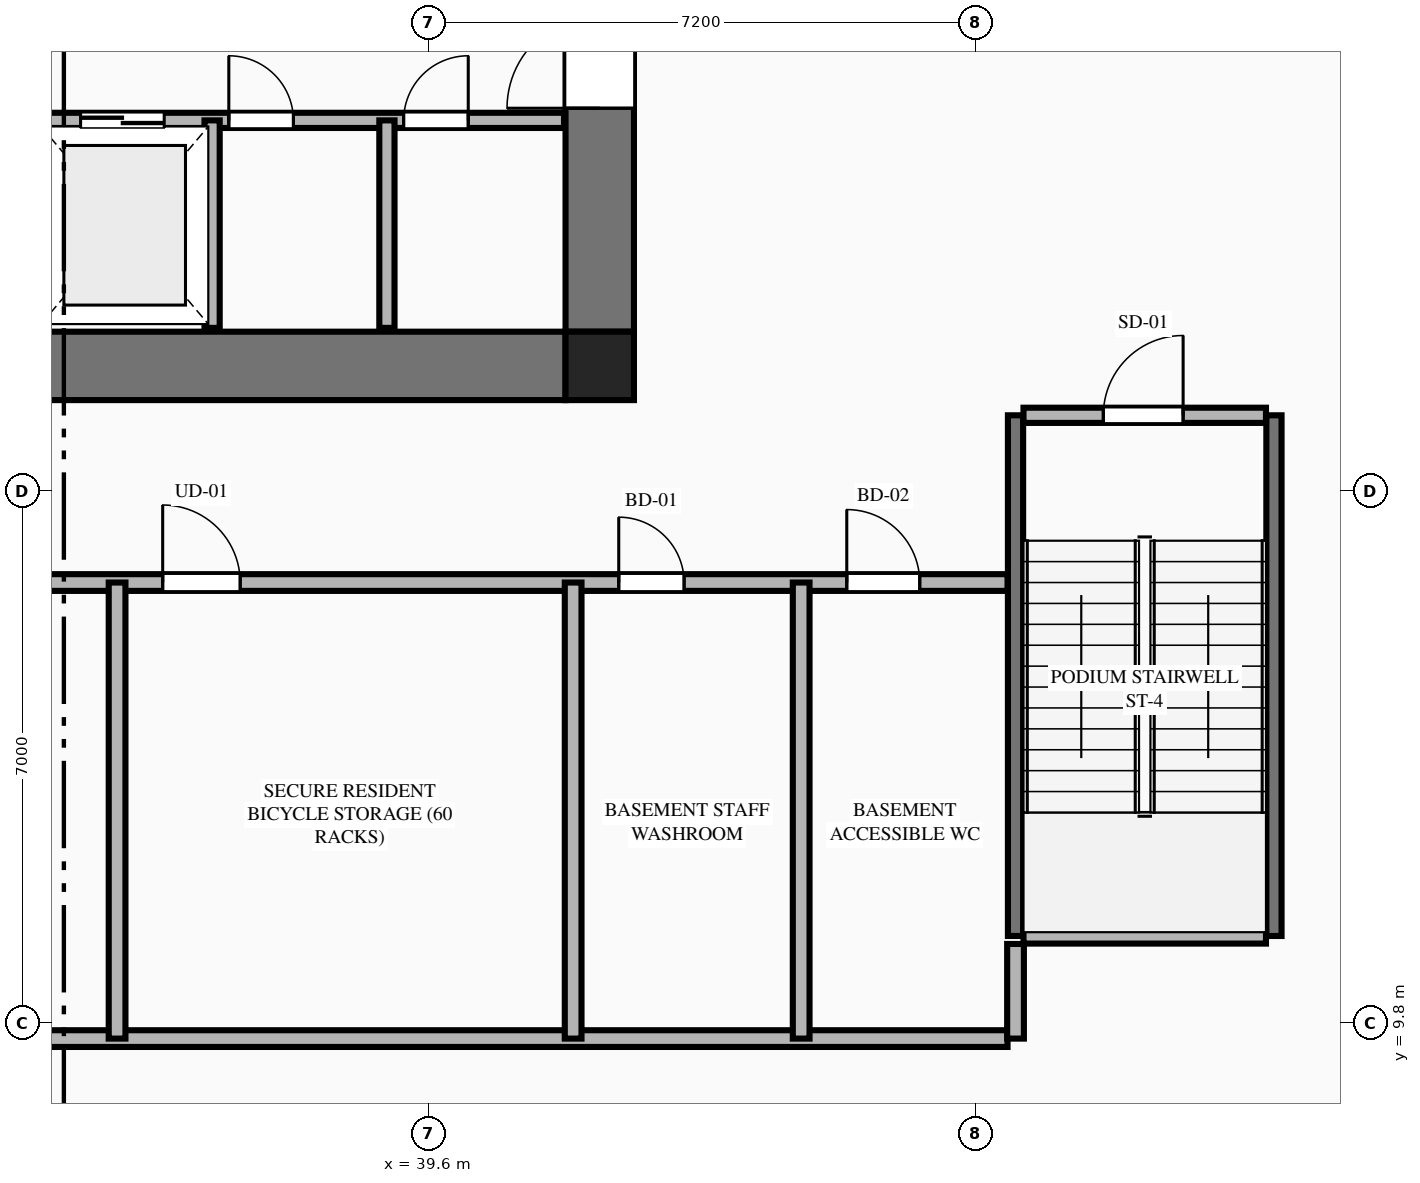
"""IFC4 building model, lengths in metres.
Left out: names, types, materials, properties, quantities, classifications, styles, units other than length and angle.
Written with IfcOpenShell. Run it as: python <this file> out.ifc"""

import sys

from ifc_helpers import new_model, si_unit, direction, frame, frame_2d, origin, origin_2d, place, context, subcontext, project, spatial, rectangle, extrude, element, fill, save


model = new_model("IFC4")
c1 = context("Model", 3, precision=1e-05, world=origin(), true_north=direction((0.0, 1.0)))
c2 = subcontext(c1, "Body", "Model", "MODEL_VIEW")
j1 = project(units=[si_unit("LENGTHUNIT", "METRE"), si_unit("PLANEANGLEUNIT", "RADIAN")], contexts=[c1])
p1 = place(None, origin())
s1 = spatial("IfcSite", under=j1, at=p1, CompositionType="ELEMENT")
p2 = place(p1, origin())
s2 = spatial("IfcBuilding", under=s1, at=p2, CompositionType="ELEMENT")
p3 = place(p2, frame((0.0, 0.0, -4.8)))
s3 = spatial("IfcBuildingStorey", under=s2, at=p3, CompositionType="ELEMENT", Elevation=-4.8)
p4 = place(p3, frame((51.103, 1.612, 0.0), z_axis=(0.0, 0.0, 1.0), x_axis=(0.484504224603, 0.874788921021, 0.0)))
e1 = element("IfcWall", 1, at=p4, inside=s3, PredefinedType="USERDEFINED", context=c2, shape_type="SweptSolid", body=[
    extrude(rectangle(XDim=26.15, YDim=0.6, at=frame_2d((13.075, 0.0))), origin(), (0.0, 0.0, 1.0), 4.55),
])
p5 = place(p3, frame((41.85, 18.45, 0.0), z_axis=(0.0, 0.0, 1.0), x_axis=(1.0, 0.0, 0.0)))
e2 = element("IfcColumn", 2, at=p5, inside=s3, PredefinedType="COLUMN", context=c2, shape_type="SweptSolid", body=[
    extrude(rectangle(XDim=0.9, YDim=0.9, at=origin_2d()), origin(), (0.0, 0.0, 1.0), 4.8),
])
p6 = place(p3, frame((23.4, 18.45, 0.0), z_axis=(0.0, 0.0, 1.0), x_axis=(1.0, 0.0, 0.0)))
e3 = element("IfcWall", 3, at=p6, inside=s3, PredefinedType="SHEAR", context=c2, shape_type="SweptSolid", body=[
    extrude(rectangle(XDim=18.0, YDim=0.9, at=frame_2d((9.0, 0.0))), origin(), (0.0, 0.0, 1.0), 4.55),
])
p7 = place(p3, frame((41.85, 18.9, 0.0), z_axis=(0.0, 0.0, 1.0), x_axis=(0.0, 1.0, 0.0)))
e4 = element("IfcWall", 4, at=p7, inside=s3, PredefinedType="SHEAR", context=c2, shape_type="SweptSolid", body=[
    extrude(rectangle(XDim=14.0, YDim=0.9, at=frame_2d((7.0, 0.0))), origin(), (0.0, 0.0, 1.0), 4.55),
])
p8 = place(p7, frame((2.94, 0.0, 0.0)))
e5 = element("IfcOpeningElement", 5, at=p8, cuts=e4, PredefinedType="OPENING", context=c2, shape_type="SweptSolid", body=[
    extrude(rectangle(XDim=1.22, YDim=2.25, at=frame_2d((0.61, 1.125))), frame((0.0, 0.46, 0.0), z_axis=(0.0, -1.0, 0.0), x_axis=(1.0, 0.0, 0.0)), (0.0, 0.0, 1.0), 0.92),
])
p9 = place(p3, frame((23.42, 21.68, 0.0), z_axis=(0.0, 0.0, 1.0), x_axis=(1.0, 0.0, 0.0)))
e6 = element("IfcWall", 6, at=p9, inside=s3, PredefinedType="PLUMBINGWALL", context=c2, shape_type="SweptSolid", body=[
    extrude(rectangle(XDim=17.96, YDim=0.2, at=frame_2d((8.98, 0.0))), origin(), (0.0, 0.0, 1.0), 4.55),
])
p10 = place(p9, frame((4.45, 0.0, 0.0)))
e7 = element("IfcOpeningElement", 7, at=p10, cuts=e6, PredefinedType="OPENING", context=c2, shape_type="SweptSolid", body=[
    extrude(rectangle(XDim=1.1, YDim=2.2, at=frame_2d((0.55, 1.1))), frame((0.0, 0.11, 0.0), z_axis=(0.0, -1.0, 0.0), x_axis=(1.0, 0.0, 0.0)), (0.0, 0.0, 1.0), 0.22),
])
p11 = place(p9, frame((6.85, 0.0, 0.0)))
e8 = element("IfcOpeningElement", 8, at=p11, cuts=e6, PredefinedType="OPENING", context=c2, shape_type="SweptSolid", body=[
    extrude(rectangle(XDim=1.1, YDim=2.2, at=frame_2d((0.55, 1.1))), frame((0.0, 0.11, 0.0), z_axis=(0.0, -1.0, 0.0), x_axis=(1.0, 0.0, 0.0)), (0.0, 0.0, 1.0), 0.22),
])
p12 = place(p9, frame((9.25, 0.0, 0.0)))
e9 = element("IfcOpeningElement", 9, at=p12, cuts=e6, PredefinedType="OPENING", context=c2, shape_type="SweptSolid", body=[
    extrude(rectangle(XDim=1.1, YDim=2.2, at=frame_2d((0.55, 1.1))), frame((0.0, 0.11, 0.0), z_axis=(0.0, -1.0, 0.0), x_axis=(1.0, 0.0, 0.0)), (0.0, 0.0, 1.0), 0.22),
])
p13 = place(p9, frame((11.6, 0.0, 0.0)))
e10 = element("IfcOpeningElement", 10, at=p13, cuts=e6, PredefinedType="OPENING", context=c2, shape_type="SweptSolid", body=[
    extrude(rectangle(XDim=1.1, YDim=2.2, at=frame_2d((0.55, 1.1))), frame((0.0, 0.11, 0.0), z_axis=(0.0, -1.0, 0.0), x_axis=(1.0, 0.0, 0.0)), (0.0, 0.0, 1.0), 0.22),
])
p14 = place(p9, frame((1.2, 0.0, 0.0)))
e11 = element("IfcOpeningElement", 11, at=p14, cuts=e6, PredefinedType="OPENING", context=c2, shape_type="SweptSolid", body=[
    extrude(rectangle(XDim=0.85, YDim=2.05, at=frame_2d((0.425, 1.025))), frame((0.0, 0.11, 0.0), z_axis=(0.0, -1.0, 0.0), x_axis=(1.0, 0.0, 0.0)), (0.0, 0.0, 1.0), 0.22),
])
p15 = place(p9, frame((13.55, 0.0, 0.0)))
e12 = element("IfcOpeningElement", 12, at=p15, cuts=e6, PredefinedType="OPENING", context=c2, shape_type="SweptSolid", body=[
    extrude(rectangle(XDim=0.85, YDim=2.05, at=frame_2d((0.425, 1.025))), frame((0.0, 0.11, 0.0), z_axis=(0.0, -1.0, 0.0), x_axis=(1.0, 0.0, 0.0)), (0.0, 0.0, 1.0), 0.22),
])
p16 = place(p9, frame((15.85, 0.0, 0.0)))
e13 = element("IfcOpeningElement", 13, at=p16, cuts=e6, PredefinedType="OPENING", context=c2, shape_type="SweptSolid", body=[
    extrude(rectangle(XDim=0.85, YDim=2.05, at=frame_2d((0.425, 1.025))), frame((0.0, 0.11, 0.0), z_axis=(0.0, -1.0, 0.0), x_axis=(1.0, 0.0, 0.0)), (0.0, 0.0, 1.0), 0.22),
])
for number, where, z_axis, x_axis in (
    (14, (36.75, 18.95, 0.0), (0.0, 0.0, 1.0), (0.0, 1.0, 0.0)),
    (15, (39.05, 18.95, 0.0), (0.0, 0.0, 1.0), (0.0, 1.0, 0.0)),
):
    element("IfcWall", number, at=place(p3, frame(where, z_axis=z_axis, x_axis=x_axis)), inside=s3, PredefinedType="PLUMBINGWALL", context=c2, shape_type="SweptSolid", body=[
        extrude(rectangle(XDim=2.73, YDim=0.2, at=frame_2d((1.365, 0.0))), origin(), (0.0, 0.0, 1.0), 4.55),
    ])
for number, where, z_axis, x_axis in (
    (16, (47.32, 10.95, 0.0), (0.0, 0.0, 1.0), (0.0, 1.0, 0.0)),
    (17, (50.72, 10.95, 0.0), (0.0, 0.0, 1.0), (0.0, 1.0, 0.0)),
):
    element("IfcWall", number, at=place(p3, frame(where, z_axis=z_axis, x_axis=x_axis)), inside=s3, PredefinedType="SHEAR", context=c2, shape_type="SweptSolid", body=[
        extrude(rectangle(XDim=6.85, YDim=0.2, at=frame_2d((3.425, 0.0))), origin(), (0.0, 0.0, 1.0), 4.8),
    ])
p17 = place(p3, frame((47.425, 10.95, 0.0), z_axis=(0.0, 0.0, 1.0), x_axis=(1.0, 0.0, 0.0)))
e18 = element("IfcWall", 18, at=p17, inside=s3, PredefinedType="PLUMBINGWALL", context=c2, shape_type="SweptSolid", body=[
    extrude(rectangle(XDim=3.19, YDim=0.2, at=frame_2d((1.595, 0.0))), origin(), (0.0, 0.0, 1.0), 4.55),
])
p18 = place(p3, frame((47.425, 17.8, 0.0), z_axis=(0.0, 0.0, 1.0), x_axis=(1.0, 0.0, 0.0)))
e19 = element("IfcWall", 19, at=p18, inside=s3, PredefinedType="PLUMBINGWALL", context=c2, shape_type="SweptSolid", body=[
    extrude(rectangle(XDim=3.19, YDim=0.2, at=frame_2d((1.595, 0.0))), origin(), (0.0, 0.0, 1.0), 4.55),
])
p19 = place(p18, frame((1.05, 0.0, 0.0)))
e20 = element("IfcOpeningElement", 20, at=p19, cuts=e19, PredefinedType="OPENING", context=c2, shape_type="SweptSolid", body=[
    extrude(rectangle(XDim=1.05, YDim=2.15, at=frame_2d((0.525, 1.075))), frame((0.0, 0.11, 0.0), z_axis=(0.0, -1.0, 0.0), x_axis=(1.0, 0.0, 0.0)), (0.0, 0.0, 1.0), 0.22),
])
p20 = place(p3, frame((17.625, 15.6, 0.0), z_axis=(0.0, 0.0, 1.0), x_axis=(1.0, 0.0, 0.0)))
e21 = element("IfcWall", 21, at=p20, inside=s3, PredefinedType="PARTITIONING", context=c2, shape_type="SweptSolid", body=[
    extrude(rectangle(XDim=29.59, YDim=0.22, at=frame_2d((14.795, 0.0))), origin(), (0.0, 0.0, 1.0), 4.55),
])
p21 = place(p20, frame((0.575, 0.0, 0.0)))
e22 = element("IfcOpeningElement", 22, at=p21, cuts=e21, PredefinedType="OPENING", context=c2, shape_type="SweptSolid", body=[
    extrude(rectangle(XDim=1.25, YDim=2.25, at=frame_2d((0.625, 1.125))), frame((0.0, 0.12, 0.0), z_axis=(0.0, -1.0, 0.0), x_axis=(1.0, 0.0, 0.0)), (0.0, 0.0, 1.0), 0.24),
])
p22 = place(p20, frame((6.475, 0.0, 0.0)))
e23 = element("IfcOpeningElement", 23, at=p22, cuts=e21, PredefinedType="OPENING", context=c2, shape_type="SweptSolid", body=[
    extrude(rectangle(XDim=1.25, YDim=2.25, at=frame_2d((0.625, 1.125))), frame((0.0, 0.12, 0.0), z_axis=(0.0, -1.0, 0.0), x_axis=(1.0, 0.0, 0.0)), (0.0, 0.0, 1.0), 0.24),
])
p23 = place(p20, frame((12.475, 0.0, 0.0)))
e24 = element("IfcOpeningElement", 24, at=p23, cuts=e21, PredefinedType="OPENING", context=c2, shape_type="SweptSolid", body=[
    extrude(rectangle(XDim=1.25, YDim=2.25, at=frame_2d((0.625, 1.125))), frame((0.0, 0.12, 0.0), z_axis=(0.0, -1.0, 0.0), x_axis=(1.0, 0.0, 0.0)), (0.0, 0.0, 1.0), 0.24),
])
p24 = place(p20, frame((18.475, 0.0, 0.0)))
e25 = element("IfcOpeningElement", 25, at=p24, cuts=e21, PredefinedType="OPENING", context=c2, shape_type="SweptSolid", body=[
    extrude(rectangle(XDim=1.02, YDim=2.25, at=frame_2d((0.51, 1.125))), frame((0.0, 0.12, 0.0), z_axis=(0.0, -1.0, 0.0), x_axis=(1.0, 0.0, 0.0)), (0.0, 0.0, 1.0), 0.24),
])
p25 = place(p20, frame((24.475, 0.0, 0.0)))
e26 = element("IfcOpeningElement", 26, at=p25, cuts=e21, PredefinedType="OPENING", context=c2, shape_type="SweptSolid", body=[
    extrude(rectangle(XDim=0.86, YDim=2.1, at=frame_2d((0.43, 1.05))), frame((0.0, 0.12, 0.0), z_axis=(0.0, -1.0, 0.0), x_axis=(1.0, 0.0, 0.0)), (0.0, 0.0, 1.0), 0.24),
])
p26 = place(p20, frame((27.475, 0.0, 0.0)))
e27 = element("IfcOpeningElement", 27, at=p26, cuts=e21, PredefinedType="OPENING", context=c2, shape_type="SweptSolid", body=[
    extrude(rectangle(XDim=0.96, YDim=2.15, at=frame_2d((0.48, 1.075))), frame((0.0, 0.12, 0.0), z_axis=(0.0, -1.0, 0.0), x_axis=(1.0, 0.0, 0.0)), (0.0, 0.0, 1.0), 0.24),
])
p27 = place(p20, frame((2.1, 0.0, 0.0)))
e28 = element("IfcOpeningElement", 28, at=p27, cuts=e21, PredefinedType="OPENING", context=c2, shape_type="SweptSolid", body=[
    extrude(rectangle(XDim=3.0, YDim=2.55, at=frame_2d((1.5, 1.275))), frame((0.0, 0.12, 0.0), z_axis=(0.0, -1.0, 0.0), x_axis=(1.0, 0.0, 0.0)), (0.0, 0.0, 1.0), 0.24),
])
p28 = place(p3, frame((17.625, 9.6, 0.0), z_axis=(0.0, 0.0, 1.0), x_axis=(1.0, 0.0, 0.0)))
e29 = element("IfcWall", 29, at=p28, inside=s3, PredefinedType="PARTITIONING", context=c2, shape_type="SweptSolid", body=[
    extrude(rectangle(XDim=29.59, YDim=0.22, at=frame_2d((14.795, 0.0))), origin(), (0.0, 0.0, 1.0), 4.55),
])
p29 = place(p3, frame((47.32, 9.6, 0.0), z_axis=(0.0, 0.0, 1.0), x_axis=(0.0, 1.0, 0.0)))
e30 = element("IfcWall", 30, at=p29, inside=s3, PredefinedType="PARTITIONING", context=c2, shape_type="SweptSolid", body=[
    extrude(rectangle(XDim=1.245, YDim=0.22, at=frame_2d((0.623, 0.0))), origin(), (0.0, 0.0, 1.0), 4.55),
])
for number, where, z_axis, x_axis in (
    (31, (35.5, 9.6, 0.0), (0.0, 0.0, 1.0), (0.0, 1.0, 0.0)),
    (32, (41.5, 9.6, 0.0), (0.0, 0.0, 1.0), (0.0, 1.0, 0.0)),
    (33, (44.5, 9.6, 0.0), (0.0, 0.0, 1.0), (0.0, 1.0, 0.0)),
):
    element("IfcWall", number, at=place(p3, frame(where, z_axis=z_axis, x_axis=x_axis)), inside=s3, PredefinedType="PARTITIONING", context=c2, shape_type="SweptSolid", body=[
        extrude(rectangle(XDim=6.0, YDim=0.22, at=frame_2d((3.0, 0.0))), origin(), (0.0, 0.0, 1.0), 4.55),
    ])
p30 = place(p8, origin())
e34 = element("IfcDoor", 34, at=p30, inside=s3, OperationType="SINGLE_SWING_LEFT", PredefinedType="DOOR", context=c2, shape_type="SweptSolid", body=[
    extrude(rectangle(XDim=1.22, YDim=2.25, at=frame_2d((0.61, 1.125))), frame((0.0, 0.025, 0.0), z_axis=(0.0, -1.0, 0.0), x_axis=(1.0, 0.0, 0.0)), (0.0, 0.0, 1.0), 0.05),
])
fill(e5, e34)
p31 = place(p13, origin())
e35 = element("IfcDoor", 35, at=p31, inside=s3, OperationType="DOUBLE_DOOR_SLIDING", PredefinedType="DOOR", context=c2, shape_type="SweptSolid", body=[
    extrude(rectangle(XDim=1.1, YDim=2.2, at=frame_2d((0.55, 1.1))), frame((0.0, 0.025, 0.0), z_axis=(0.0, -1.0, 0.0), x_axis=(1.0, 0.0, 0.0)), (0.0, 0.0, 1.0), 0.05),
])
fill(e10, e35)
p32 = place(p15, origin())
e36 = element("IfcDoor", 36, at=p32, inside=s3, OperationType="SINGLE_SWING_LEFT", PredefinedType="DOOR", context=c2, shape_type="SweptSolid", body=[
    extrude(rectangle(XDim=0.85, YDim=2.05, at=frame_2d((0.425, 1.025))), frame((0.0, 0.025, 0.0), z_axis=(0.0, -1.0, 0.0), x_axis=(1.0, 0.0, 0.0)), (0.0, 0.0, 1.0), 0.05),
])
fill(e12, e36)
p33 = place(p16, origin())
e37 = element("IfcDoor", 37, at=p33, inside=s3, OperationType="SINGLE_SWING_RIGHT", PredefinedType="DOOR", context=c2, shape_type="SweptSolid", body=[
    extrude(rectangle(XDim=0.85, YDim=2.05, at=frame_2d((0.425, 1.025))), frame((0.0, 0.025, 0.0), z_axis=(0.0, -1.0, 0.0), x_axis=(1.0, 0.0, 0.0)), (0.0, 0.0, 1.0), 0.05),
])
fill(e13, e37)
p34 = place(p19, origin())
e38 = element("IfcDoor", 38, at=p34, inside=s3, OperationType="SINGLE_SWING_RIGHT", PredefinedType="DOOR", context=c2, shape_type="SweptSolid", body=[
    extrude(rectangle(XDim=1.05, YDim=2.15, at=frame_2d((0.525, 1.075))), frame((0.0, 0.025, 0.0), z_axis=(0.0, -1.0, 0.0), x_axis=(1.0, 0.0, 0.0)), (0.0, 0.0, 1.0), 0.05),
])
fill(e20, e38)
p35 = place(p24, origin())
e39 = element("IfcDoor", 39, at=p35, inside=s3, OperationType="SINGLE_SWING_LEFT", PredefinedType="DOOR", context=c2, shape_type="SweptSolid", body=[
    extrude(rectangle(XDim=1.02, YDim=2.25, at=frame_2d((0.51, 1.125))), frame((0.0, 0.025, 0.0), z_axis=(0.0, -1.0, 0.0), x_axis=(1.0, 0.0, 0.0)), (0.0, 0.0, 1.0), 0.05),
])
fill(e25, e39)
p36 = place(p25, origin())
e40 = element("IfcDoor", 40, at=p36, inside=s3, OperationType="SINGLE_SWING_LEFT", PredefinedType="DOOR", context=c2, shape_type="SweptSolid", body=[
    extrude(rectangle(XDim=0.86, YDim=2.1, at=frame_2d((0.43, 1.05))), frame((0.0, 0.025, 0.0), z_axis=(0.0, -1.0, 0.0), x_axis=(1.0, 0.0, 0.0)), (0.0, 0.0, 1.0), 0.05),
])
fill(e26, e40)
p37 = place(p26, origin())
e41 = element("IfcDoor", 41, at=p37, inside=s3, OperationType="SINGLE_SWING_LEFT", PredefinedType="DOOR", context=c2, shape_type="SweptSolid", body=[
    extrude(rectangle(XDim=0.96, YDim=2.15, at=frame_2d((0.48, 1.075))), frame((0.0, 0.025, 0.0), z_axis=(0.0, -1.0, 0.0), x_axis=(1.0, 0.0, 0.0)), (0.0, 0.0, 1.0), 0.05),
])
fill(e27, e41)
save(model, sys.argv[1])
